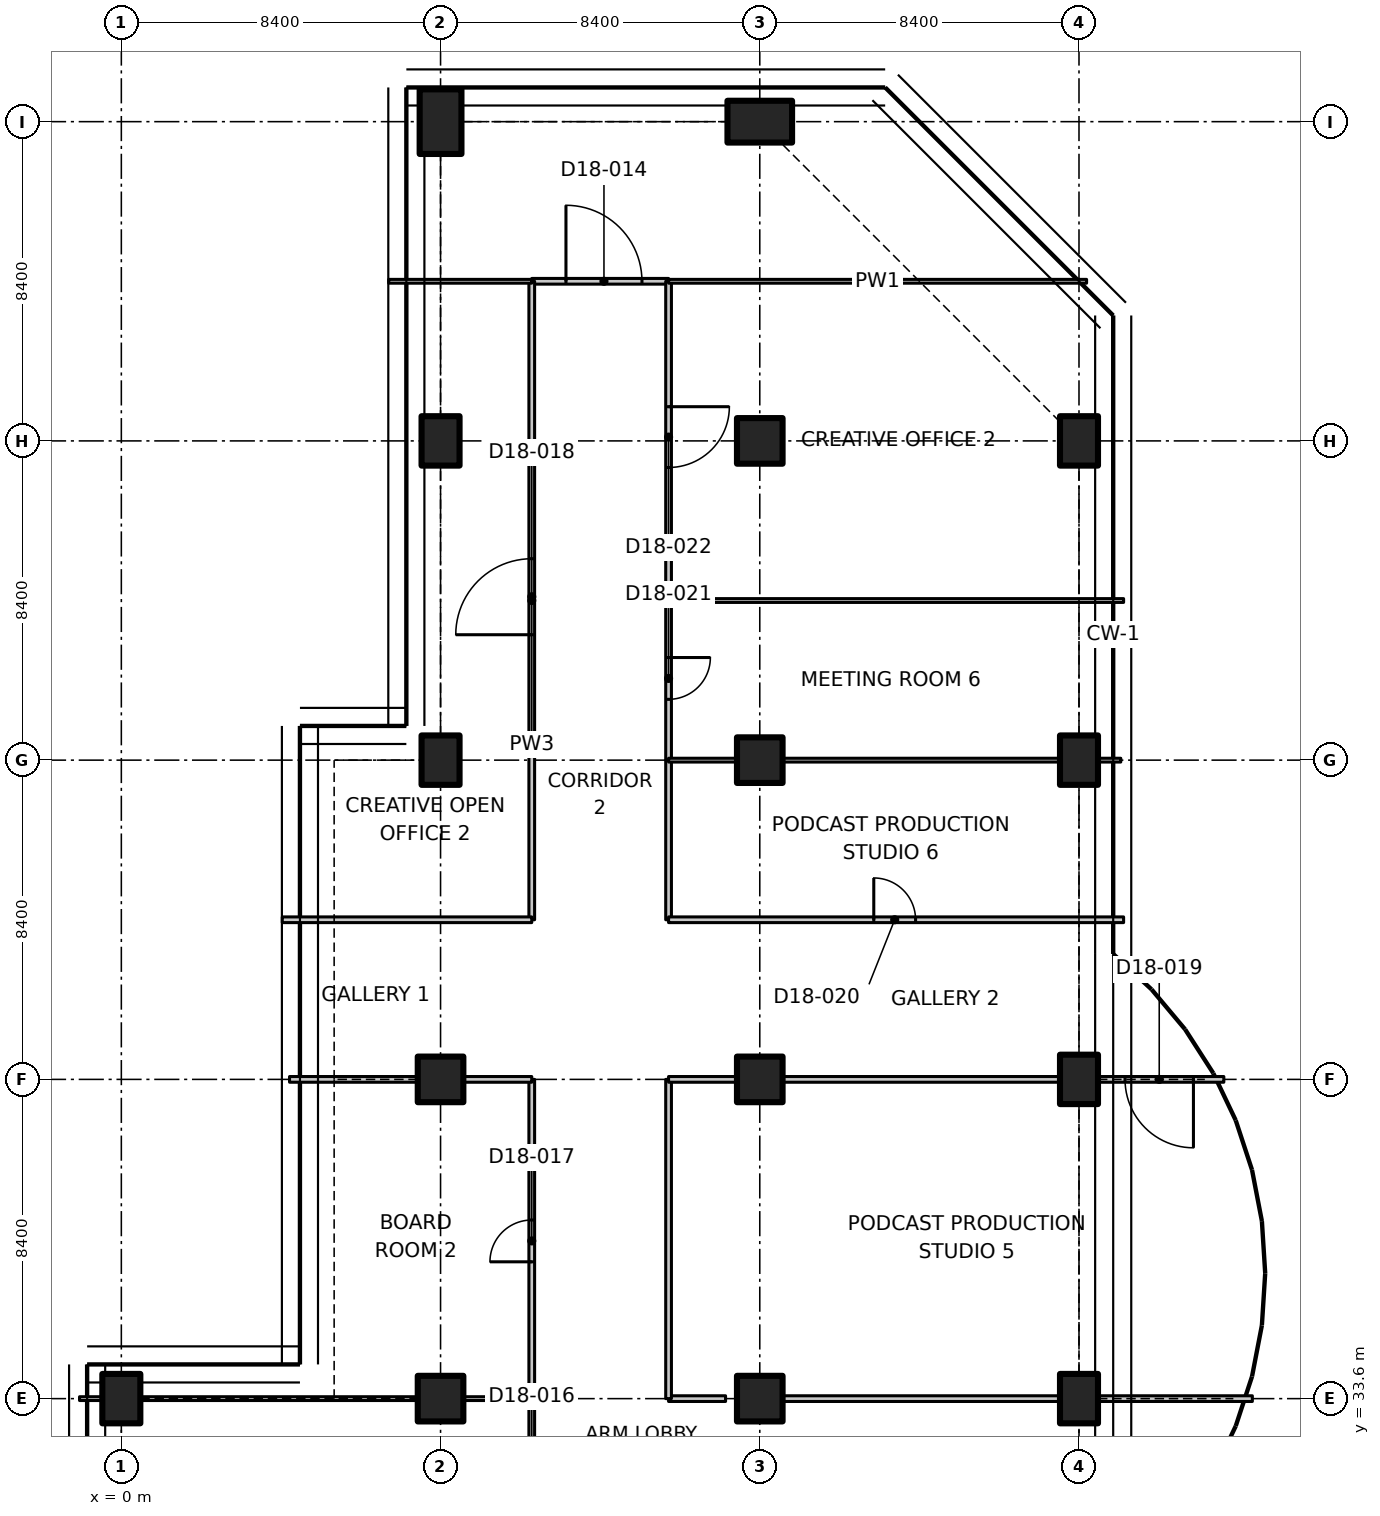
"""IFC4 building model, lengths in metres.
Left out: names, types, materials, properties, quantities, classifications, styles, units other than length and angle.
Written with IfcOpenShell. Run it as: python <this file> out.ifc"""

import sys

from ifc_helpers import new_model, si_unit, direction, frame, frame_2d, origin, origin_2d, place, context, subcontext, project, spatial, polyline, rectangle, outline, extrude, element, fill, save


model = new_model("IFC4")
c1 = context("Model", 3, precision=1e-05, world=origin(), true_north=direction((0.0, 1.0)))
c2 = subcontext(c1, "Body", "Model", "MODEL_VIEW")
j1 = project(units=[si_unit("LENGTHUNIT", "METRE"), si_unit("PLANEANGLEUNIT", "RADIAN")], contexts=[c1])
p1 = place(None, origin())
s1 = spatial("IfcSite", under=j1, at=p1, CompositionType="ELEMENT")
p2 = place(p1, origin())
s2 = spatial("IfcBuilding", under=s1, at=p2, CompositionType="ELEMENT")
p3 = place(p2, frame((0.0, 0.0, 152.9)))
s3 = spatial("IfcBuildingStorey", under=s2, at=p3, CompositionType="ELEMENT", Elevation=152.9)
p4 = place(p3, frame((0.0, 33.6, 0.0), z_axis=(0.0, 0.0, 1.0), x_axis=(1.0, 0.0, 0.0)))
e1 = element("IfcColumn", 1, at=p4, inside=s3, PredefinedType="COLUMN", context=c2, shape_type="SweptSolid", body=[
    extrude(rectangle(XDim=1.0, YDim=1.3, at=origin_2d()), origin(), (0.0, 0.0, 1.0), 3.3),
])
for number, where, z_axis, x_axis in (
    (2, (8.4, 33.6, 0.0), (0.0, 0.0, 1.0), (1.0, 0.0, 0.0)),
    (3, (8.4, 42.0, 0.0), (0.0, 0.0, 1.0), (1.0, 0.0, 0.0)),
):
    element("IfcColumn", number, at=place(p3, frame(where, z_axis=z_axis, x_axis=x_axis)), inside=s3, PredefinedType="COLUMN", context=c2, shape_type="SweptSolid", body=[
        extrude(rectangle(XDim=1.2, YDim=1.2, at=origin_2d()), origin(), (0.0, 0.0, 1.0), 3.3),
    ])
for number, where, z_axis, x_axis in (
    (4, (8.4, 50.4, 0.0), (0.0, 0.0, 1.0), (1.0, 0.0, 0.0)),
    (5, (8.4, 58.8, 0.0), (0.0, 0.0, 1.0), (1.0, 0.0, 0.0)),
):
    element("IfcColumn", number, at=place(p3, frame(where, z_axis=z_axis, x_axis=x_axis)), inside=s3, PredefinedType="COLUMN", context=c2, shape_type="SweptSolid", body=[
        extrude(rectangle(XDim=1.0, YDim=1.3, at=origin_2d()), origin(), (0.0, 0.0, 1.0), 3.3),
    ])
p5 = place(p3, frame((8.4, 67.2, 0.0), z_axis=(0.0, 0.0, 1.0), x_axis=(1.0, 0.0, 0.0)))
e6 = element("IfcColumn", 6, at=p5, inside=s3, PredefinedType="COLUMN", context=c2, shape_type="SweptSolid", body=[
    extrude(rectangle(XDim=1.1, YDim=1.7, at=origin_2d()), origin(), (0.0, 0.0, 1.0), 3.3),
])
for number, where, z_axis, x_axis in (
    (7, (16.8, 33.6, 0.0), (0.0, 0.0, 1.0), (1.0, 0.0, 0.0)),
    (8, (16.8, 42.0, 0.0), (0.0, 0.0, 1.0), (1.0, 0.0, 0.0)),
    (9, (16.8, 50.4, 0.0), (0.0, 0.0, 1.0), (1.0, 0.0, 0.0)),
    (10, (16.8, 58.8, 0.0), (0.0, 0.0, 1.0), (1.0, 0.0, 0.0)),
):
    element("IfcColumn", number, at=place(p3, frame(where, z_axis=z_axis, x_axis=x_axis)), inside=s3, PredefinedType="COLUMN", context=c2, shape_type="SweptSolid", body=[
        extrude(rectangle(XDim=1.2, YDim=1.2, at=origin_2d()), origin(), (0.0, 0.0, 1.0), 3.3),
    ])
p6 = place(p3, frame((16.8, 67.2, 0.0), z_axis=(0.0, 0.0, 1.0), x_axis=(0.0, 1.0, 0.0)))
e11 = element("IfcColumn", 11, at=p6, inside=s3, PredefinedType="COLUMN", context=c2, shape_type="SweptSolid", body=[
    extrude(rectangle(XDim=1.1, YDim=1.7, at=origin_2d()), origin(), (0.0, 0.0, 1.0), 3.3),
])
for number, where, z_axis, x_axis in (
    (12, (25.2, 33.6, 0.0), (0.0, 0.0, 1.0), (1.0, 0.0, 0.0)),
    (13, (25.2, 42.0, 0.0), (0.0, 0.0, 1.0), (1.0, 0.0, 0.0)),
    (14, (25.2, 50.4, 0.0), (0.0, 0.0, 1.0), (1.0, 0.0, 0.0)),
    (15, (25.2, 58.8, 0.0), (0.0, 0.0, 1.0), (1.0, 0.0, 0.0)),
):
    element("IfcColumn", number, at=place(p3, frame(where, z_axis=z_axis, x_axis=x_axis)), inside=s3, PredefinedType="COLUMN", context=c2, shape_type="SweptSolid", body=[
        extrude(rectangle(XDim=1.0, YDim=1.3, at=origin_2d()), origin(), (0.0, 0.0, 1.0), 3.3),
    ])
p7 = place(p3, frame((10.8, 29.4, 0.0), z_axis=(0.0, 0.0, 1.0), x_axis=(0.0, 1.0, 0.0)))
e16 = element("IfcWall", 16, at=p7, inside=s3, PredefinedType="PARTITIONING", context=c2, shape_type="SweptSolid", body=[
    extrude(rectangle(XDim=4.2, YDim=0.15, at=frame_2d((2.1, 0.0))), origin(), (0.0, 0.0, 1.0), 3.28),
])
p8 = place(p7, frame((1.5, 0.0, 0.0)))
e17 = element("IfcOpeningElement", 17, at=p8, cuts=e16, PredefinedType="OPENING", context=c2, shape_type="SweptSolid", body=[
    extrude(rectangle(XDim=1.1, YDim=2.1, at=frame_2d((0.55, 1.05))), frame((0.0, 0.085, 0.0), z_axis=(0.0, -1.0, 0.0), x_axis=(1.0, 0.0, 0.0)), (0.0, 0.0, 1.0), 0.17),
])
p9 = place(p3, frame((14.4, 33.6, 0.0), z_axis=(0.0, 0.0, 1.0), x_axis=(1.0, 0.0, 0.0)))
e18 = element("IfcWall", 18, at=p9, inside=s3, PredefinedType="PARTITIONING", context=c2, shape_type="SweptSolid", body=[
    extrude(rectangle(XDim=1.5, YDim=0.15, at=frame_2d((0.75, 0.0))), origin(), (0.0, 0.0, 1.0), 3.28),
])
p10 = place(p3, frame((17.42, 33.6, 0.0), z_axis=(0.0, 0.0, 1.0), x_axis=(1.0, 0.0, 0.0)))
e19 = element("IfcWall", 19, at=p10, inside=s3, PredefinedType="PARTITIONING", context=c2, shape_type="SweptSolid", body=[
    extrude(rectangle(XDim=7.26, YDim=0.15, at=frame_2d((3.63, 0.0))), origin(), (0.0, 0.0, 1.0), 3.28),
])
p11 = place(p3, frame((25.72, 33.6, 0.0), z_axis=(0.0, 0.0, 1.0), x_axis=(1.0, 0.0, 0.0)))
e20 = element("IfcWall", 20, at=p11, inside=s3, PredefinedType="PARTITIONING", context=c2, shape_type="SweptSolid", body=[
    extrude(rectangle(XDim=4.042, YDim=0.15, at=frame_2d((2.021, 0.0))), origin(), (0.0, 0.0, 1.0), 2.93),
])
p12 = place(p3, frame((10.8, 63.0, 0.0), z_axis=(0.0, 0.0, 1.0), x_axis=(1.0, 0.0, 0.0)))
e21 = element("IfcWall", 21, at=p12, inside=s3, PredefinedType="PARTITIONING", context=c2, shape_type="SweptSolid", body=[
    extrude(rectangle(XDim=3.6, YDim=0.15, at=frame_2d((1.8, 0.0))), origin(), (0.0, 0.0, 1.0), 3.28),
])
p13 = place(p12, frame((0.9, 0.0, 0.0)))
e22 = element("IfcOpeningElement", 22, at=p13, cuts=e21, PredefinedType="OPENING", context=c2, shape_type="SweptSolid", body=[
    extrude(rectangle(XDim=2.0, YDim=2.4, at=frame_2d((1.0, 1.2))), frame((0.0, 0.085, 0.0), z_axis=(0.0, -1.0, 0.0), x_axis=(1.0, 0.0, 0.0)), (0.0, 0.0, 1.0), 0.17),
])
p14 = place(p3, frame((10.8, 33.6, 0.0), z_axis=(0.0, 0.0, 1.0), x_axis=(0.0, 1.0, 0.0)))
e23 = element("IfcWall", 23, at=p14, inside=s3, PredefinedType="PARTITIONING", context=c2, shape_type="SweptSolid", body=[
    extrude(rectangle(XDim=8.4, YDim=0.15, at=frame_2d((4.2, 0.0))), origin(), (0.0, 0.0, 1.0), 3.28),
])
p15 = place(p14, frame((3.6, 0.0, 0.0)))
e24 = element("IfcOpeningElement", 24, at=p15, cuts=e23, PredefinedType="OPENING", context=c2, shape_type="SweptSolid", body=[
    extrude(rectangle(XDim=1.1, YDim=2.1, at=frame_2d((0.55, 1.05))), frame((0.0, 0.085, 0.0), z_axis=(0.0, -1.0, 0.0), x_axis=(1.0, 0.0, 0.0)), (0.0, 0.0, 1.0), 0.17),
])
p16 = place(p3, frame((10.8, 46.2, 0.0), z_axis=(0.0, 0.0, 1.0), x_axis=(0.0, 1.0, 0.0)))
e25 = element("IfcWall", 25, at=p16, inside=s3, PredefinedType="PARTITIONING", context=c2, shape_type="SweptSolid", body=[
    extrude(rectangle(XDim=16.8, YDim=0.15, at=frame_2d((8.4, 0.0))), origin(), (0.0, 0.0, 1.0), 3.28),
])
p17 = place(p16, frame((7.5, 0.0, 0.0)))
e26 = element("IfcOpeningElement", 26, at=p17, cuts=e25, PredefinedType="OPENING", context=c2, shape_type="SweptSolid", body=[
    extrude(rectangle(XDim=2.0, YDim=2.4, at=frame_2d((1.0, 1.2))), frame((0.0, 0.085, 0.0), z_axis=(0.0, -1.0, 0.0), x_axis=(1.0, 0.0, 0.0)), (0.0, 0.0, 1.0), 0.17),
])
p18 = place(p3, frame((14.4, 42.0, 0.0), z_axis=(0.0, 0.0, 1.0), x_axis=(0.0, -1.0, 0.0)))
e27 = element("IfcWall", 27, at=p18, inside=s3, PredefinedType="PARTITIONING", context=c2, shape_type="SweptSolid", body=[
    extrude(rectangle(XDim=8.4, YDim=0.15, at=frame_2d((4.2, 0.0))), origin(), (0.0, 0.0, 1.0), 3.28),
])
p19 = place(p3, frame((14.4, 50.4, 0.0), z_axis=(0.0, 0.0, 1.0), x_axis=(0.0, -1.0, 0.0)))
e28 = element("IfcWall", 28, at=p19, inside=s3, PredefinedType="PARTITIONING", context=c2, shape_type="SweptSolid", body=[
    extrude(rectangle(XDim=4.2, YDim=0.15, at=frame_2d((2.1, 0.0))), origin(), (0.0, 0.0, 1.0), 3.28),
])
p20 = place(p3, frame((14.4, 54.6, 0.0), z_axis=(0.0, 0.0, 1.0), x_axis=(0.0, -1.0, 0.0)))
e29 = element("IfcWall", 29, at=p20, inside=s3, PredefinedType="PARTITIONING", context=c2, shape_type="SweptSolid", body=[
    extrude(rectangle(XDim=4.2, YDim=0.15, at=frame_2d((2.1, 0.0))), origin(), (0.0, 0.0, 1.0), 3.28),
])
p21 = place(p20, frame((1.5, 0.0, 0.0)))
e30 = element("IfcOpeningElement", 30, at=p21, cuts=e29, PredefinedType="OPENING", context=c2, shape_type="SweptSolid", body=[
    extrude(rectangle(XDim=1.1, YDim=2.1, at=frame_2d((0.55, 1.05))), frame((0.0, 0.085, 0.0), z_axis=(0.0, -1.0, 0.0), x_axis=(1.0, 0.0, 0.0)), (0.0, 0.0, 1.0), 0.17),
])
p22 = place(p3, frame((14.4, 63.0, 0.0), z_axis=(0.0, 0.0, 1.0), x_axis=(0.0, -1.0, 0.0)))
e31 = element("IfcWall", 31, at=p22, inside=s3, PredefinedType="PARTITIONING", context=c2, shape_type="SweptSolid", body=[
    extrude(rectangle(XDim=8.4, YDim=0.15, at=frame_2d((4.2, 0.0))), origin(), (0.0, 0.0, 1.0), 3.28),
])
p23 = place(p22, frame((3.3, 0.0, 0.0)))
e32 = element("IfcOpeningElement", 32, at=p23, cuts=e31, PredefinedType="OPENING", context=c2, shape_type="SweptSolid", body=[
    extrude(rectangle(XDim=1.6, YDim=2.1, at=frame_2d((0.8, 1.05))), frame((0.0, 0.085, 0.0), z_axis=(0.0, -1.0, 0.0), x_axis=(1.0, 0.0, 0.0)), (0.0, 0.0, 1.0), 0.17),
])
p24 = place(p3, frame((10.8, 63.0, 0.0), z_axis=(0.0, 0.0, 1.0), x_axis=(-1.0, 0.0, 0.0)))
e33 = element("IfcWall", 33, at=p24, inside=s3, PredefinedType="PARTITIONING", context=c2, shape_type="SweptSolid", body=[
    extrude(rectangle(XDim=3.765, YDim=0.1, at=frame_2d((1.883, 0.0))), origin(), (0.0, 0.0, 1.0), 2.93),
])
p25 = place(p3, frame((25.4, 63.0, 0.0), z_axis=(0.0, 0.0, 1.0), x_axis=(-1.0, 0.0, 0.0)))
e34 = element("IfcWall", 34, at=p25, inside=s3, PredefinedType="PARTITIONING", context=c2, shape_type="SweptSolid", body=[
    extrude(outline(polyline([(0.0, 0.0), (11.0, 0.0), (11.0, 3.28), (5.066, 3.28), (5.064, 2.93), (3.736, 2.93), (3.734, 3.28), (0.0, 3.28), (0.0, 0.0)])), frame((0.0, 0.05, 0.0), z_axis=(0.0, -1.0, 0.0), x_axis=(1.0, 0.0, 0.0)), (0.0, 0.0, 1.0), 0.1),
])
p26 = place(p3, frame((10.8, 42.0, 0.0), z_axis=(0.0, 0.0, 1.0), x_axis=(-1.0, 0.0, 0.0)))
e35 = element("IfcWall", 35, at=p26, inside=s3, PredefinedType="PARTITIONING", context=c2, shape_type="SweptSolid", body=[
    extrude(rectangle(XDim=1.78, YDim=0.15, at=frame_2d((0.89, 0.0))), origin(), (0.0, 0.0, 1.0), 3.28),
])
p27 = place(p3, frame((7.78, 42.0, 0.0), z_axis=(0.0, 0.0, 1.0), x_axis=(-1.0, 0.0, 0.0)))
e36 = element("IfcWall", 36, at=p27, inside=s3, PredefinedType="PARTITIONING", context=c2, shape_type="SweptSolid", body=[
    extrude(rectangle(XDim=3.354, YDim=0.15, at=frame_2d((1.677, 0.0))), origin(), (0.0, 0.0, 1.0), 2.93),
])
p28 = place(p3, frame((4.235, 46.2, 0.0), z_axis=(0.0, 0.0, 1.0), x_axis=(1.0, 0.0, 0.0)))
e37 = element("IfcWall", 37, at=p28, inside=s3, PredefinedType="PARTITIONING", context=c2, shape_type="SweptSolid", body=[
    extrude(outline(polyline([(0.0, 0.0), (6.565, 0.0), (6.565, 3.28), (1.815, 3.28), (1.813, 2.93), (0.917, 2.93), (0.915, 3.28), (0.265, 3.28), (0.0, 3.28), (0.0, 0.0)])), frame((0.0, 0.075, 0.0), z_axis=(0.0, -1.0, 0.0), x_axis=(1.0, 0.0, 0.0)), (0.0, 0.0, 1.0), 0.15),
])
p29 = place(p3, frame((-1.1, 33.6, 0.0), z_axis=(0.0, 0.0, 1.0), x_axis=(1.0, 0.0, 0.0)))
e38 = element("IfcWall", 38, at=p29, inside=s3, PredefinedType="PARTITIONING", context=c2, shape_type="SweptSolid", body=[
    extrude(rectangle(XDim=0.58, YDim=0.1, at=frame_2d((0.29, 0.0))), origin(), (0.0, 0.0, 1.0), 3.28),
])
p30 = place(p3, frame((0.52, 33.6, 0.0), z_axis=(0.0, 0.0, 1.0), x_axis=(1.0, 0.0, 0.0)))
e39 = element("IfcWall", 39, at=p30, inside=s3, PredefinedType="PARTITIONING", context=c2, shape_type="SweptSolid", body=[
    extrude(outline(polyline([(0.0, 0.0), (7.26, 0.0), (7.26, 2.93), (0.0, 2.93), (0.0, 0.0)])), frame((0.0, 0.05, 0.0), z_axis=(0.0, -1.0, 0.0), x_axis=(1.0, 0.0, 0.0)), (0.0, 0.0, 1.0), 0.1),
])
p31 = place(p3, frame((9.02, 33.6, 0.0), z_axis=(0.0, 0.0, 1.0), x_axis=(1.0, 0.0, 0.0)))
e40 = element("IfcWall", 40, at=p31, inside=s3, PredefinedType="PARTITIONING", context=c2, shape_type="SweptSolid", body=[
    extrude(rectangle(XDim=1.78, YDim=0.1, at=frame_2d((0.89, 0.0))), origin(), (0.0, 0.0, 1.0), 3.28),
])
p32 = place(p3, frame((29.011, 42.0, 0.0), z_axis=(0.0, 0.0, 1.0), x_axis=(-1.0, 0.0, 0.0)))
e41 = element("IfcWall", 41, at=p32, inside=s3, PredefinedType="PARTITIONING", context=c2, shape_type="SweptSolid", body=[
    extrude(rectangle(XDim=3.292, YDim=0.15, at=frame_2d((1.646, 0.0))), origin(), (0.0, 0.0, 1.0), 2.93),
])
p33 = place(p32, frame((0.8, 0.0, 0.0)))
e42 = element("IfcOpeningElement", 42, at=p33, cuts=e41, PredefinedType="OPENING", context=c2, shape_type="SweptSolid", body=[
    extrude(rectangle(XDim=1.8, YDim=2.1, at=frame_2d((0.9, 1.05))), frame((0.0, 0.085, 0.0), z_axis=(0.0, -1.0, 0.0), x_axis=(1.0, 0.0, 0.0)), (0.0, 0.0, 1.0), 0.17),
])
p34 = place(p3, frame((24.68, 42.0, 0.0), z_axis=(0.0, 0.0, 1.0), x_axis=(-1.0, 0.0, 0.0)))
e43 = element("IfcWall", 43, at=p34, inside=s3, PredefinedType="PARTITIONING", context=c2, shape_type="SweptSolid", body=[
    extrude(rectangle(XDim=7.26, YDim=0.15, at=frame_2d((3.63, 0.0))), origin(), (0.0, 0.0, 1.0), 3.28),
])
p35 = place(p3, frame((16.18, 42.0, 0.0), z_axis=(0.0, 0.0, 1.0), x_axis=(-1.0, 0.0, 0.0)))
e44 = element("IfcWall", 44, at=p35, inside=s3, PredefinedType="PARTITIONING", context=c2, shape_type="SweptSolid", body=[
    extrude(rectangle(XDim=1.78, YDim=0.15, at=frame_2d((0.89, 0.0))), origin(), (0.0, 0.0, 1.0), 3.28),
])
p36 = place(p3, frame((14.4, 46.2, 0.0), z_axis=(0.0, 0.0, 1.0), x_axis=(1.0, 0.0, 0.0)))
e45 = element("IfcWall", 45, at=p36, inside=s3, PredefinedType="PARTITIONING", context=c2, shape_type="SweptSolid", body=[
    extrude(outline(polyline([(0.0, 0.0), (11.974, 0.0), (11.974, 3.28), (11.9, 3.28), (11.25, 3.28), (11.248, 2.93), (10.352, 2.93), (10.35, 3.28), (0.0, 3.28), (0.0, 0.0)])), frame((0.0, 0.075, 0.0), z_axis=(0.0, -1.0, 0.0), x_axis=(1.0, 0.0, 0.0)), (0.0, 0.0, 1.0), 0.15),
])
p37 = place(p36, frame((5.4, 0.0, 0.0)))
e46 = element("IfcOpeningElement", 46, at=p37, cuts=e45, PredefinedType="OPENING", context=c2, shape_type="SweptSolid", body=[
    extrude(rectangle(XDim=1.1, YDim=2.1, at=frame_2d((0.55, 1.05))), frame((0.0, 0.085, 0.0), z_axis=(0.0, -1.0, 0.0), x_axis=(1.0, 0.0, 0.0)), (0.0, 0.0, 1.0), 0.17),
])
p38 = place(p3, frame((14.4, 50.4, 0.0), z_axis=(0.0, 0.0, 1.0), x_axis=(1.0, 0.0, 0.0)))
e47 = element("IfcWall", 47, at=p38, inside=s3, PredefinedType="PARTITIONING", context=c2, shape_type="SweptSolid", body=[
    extrude(rectangle(XDim=1.78, YDim=0.1, at=frame_2d((0.89, 0.0))), origin(), (0.0, 0.0, 1.0), 3.28),
])
p39 = place(p3, frame((17.42, 50.4, 0.0), z_axis=(0.0, 0.0, 1.0), x_axis=(1.0, 0.0, 0.0)))
e48 = element("IfcWall", 48, at=p39, inside=s3, PredefinedType="PARTITIONING", context=c2, shape_type="SweptSolid", body=[
    extrude(rectangle(XDim=7.26, YDim=0.1, at=frame_2d((3.63, 0.0))), origin(), (0.0, 0.0, 1.0), 3.28),
])
p40 = place(p3, frame((25.72, 50.4, 0.0), z_axis=(0.0, 0.0, 1.0), x_axis=(1.0, 0.0, 0.0)))
e49 = element("IfcWall", 49, at=p40, inside=s3, PredefinedType="PARTITIONING", context=c2, shape_type="SweptSolid", body=[
    extrude(rectangle(XDim=0.58, YDim=0.1, at=frame_2d((0.29, 0.0))), origin(), (0.0, 0.0, 1.0), 3.28),
])
p41 = place(p3, frame((14.4, 54.6, 0.0), z_axis=(0.0, 0.0, 1.0), x_axis=(1.0, 0.0, 0.0)))
e50 = element("IfcWall", 50, at=p41, inside=s3, PredefinedType="PARTITIONING", context=c2, shape_type="SweptSolid", body=[
    extrude(outline(polyline([(0.0, 0.0), (11.974, 0.0), (11.974, 3.28), (11.9, 3.28), (11.25, 3.28), (11.248, 2.93), (10.352, 2.93), (10.35, 3.28), (0.0, 3.28), (0.0, 0.0)])), frame((0.0, 0.05, 0.0), z_axis=(0.0, -1.0, 0.0), x_axis=(1.0, 0.0, 0.0)), (0.0, 0.0, 1.0), 0.1),
])
p42 = place(p13, origin())
e51 = element("IfcDoor", 51, at=p42, inside=s3, OperationType="DOUBLE_DOOR_SINGLE_SWING", PredefinedType="DOOR", context=c2, shape_type="SweptSolid", body=[
    extrude(rectangle(XDim=2.0, YDim=2.4, at=frame_2d((1.0, 1.2))), frame((0.0, 0.025, 0.0), z_axis=(0.0, -1.0, 0.0), x_axis=(1.0, 0.0, 0.0)), (0.0, 0.0, 1.0), 0.05),
])
fill(e22, e51)
p43 = place(p15, origin())
e52 = element("IfcDoor", 52, at=p43, inside=s3, OperationType="SINGLE_SWING_LEFT", PredefinedType="DOOR", context=c2, shape_type="SweptSolid", body=[
    extrude(rectangle(XDim=1.1, YDim=2.1, at=frame_2d((0.55, 1.05))), frame((0.0, 0.025, 0.0), z_axis=(0.0, -1.0, 0.0), x_axis=(1.0, 0.0, 0.0)), (0.0, 0.0, 1.0), 0.05),
])
fill(e24, e52)
p44 = place(p17, origin())
e53 = element("IfcDoor", 53, at=p44, inside=s3, OperationType="DOUBLE_DOOR_SINGLE_SWING", PredefinedType="DOOR", context=c2, shape_type="SweptSolid", body=[
    extrude(rectangle(XDim=2.0, YDim=2.4, at=frame_2d((1.0, 1.2))), frame((0.0, 0.025, 0.0), z_axis=(0.0, -1.0, 0.0), x_axis=(1.0, 0.0, 0.0)), (0.0, 0.0, 1.0), 0.05),
])
fill(e26, e53)
p45 = place(p33, origin())
e54 = element("IfcDoor", 54, at=p45, inside=s3, OperationType="DOUBLE_DOOR_SINGLE_SWING", PredefinedType="DOOR", context=c2, shape_type="SweptSolid", body=[
    extrude(rectangle(XDim=1.8, YDim=2.1, at=frame_2d((0.9, 1.05))), frame((0.0, 0.025, 0.0), z_axis=(0.0, -1.0, 0.0), x_axis=(1.0, 0.0, 0.0)), (0.0, 0.0, 1.0), 0.05),
])
fill(e42, e54)
p46 = place(p37, origin())
e55 = element("IfcDoor", 55, at=p46, inside=s3, OperationType="SINGLE_SWING_LEFT", PredefinedType="DOOR", context=c2, shape_type="SweptSolid", body=[
    extrude(rectangle(XDim=1.1, YDim=2.1, at=frame_2d((0.55, 1.05))), frame((0.0, 0.025, 0.0), z_axis=(0.0, -1.0, 0.0), x_axis=(1.0, 0.0, 0.0)), (0.0, 0.0, 1.0), 0.05),
])
fill(e46, e55)
p47 = place(p21, origin())
e56 = element("IfcDoor", 56, at=p47, inside=s3, OperationType="SINGLE_SWING_LEFT", PredefinedType="DOOR", context=c2, shape_type="SweptSolid", body=[
    extrude(rectangle(XDim=1.1, YDim=2.1, at=frame_2d((0.55, 1.05))), frame((0.0, 0.025, 0.0), z_axis=(0.0, -1.0, 0.0), x_axis=(1.0, 0.0, 0.0)), (0.0, 0.0, 1.0), 0.05),
])
fill(e30, e56)
p48 = place(p23, origin())
e57 = element("IfcDoor", 57, at=p48, inside=s3, OperationType="DOUBLE_DOOR_SINGLE_SWING", PredefinedType="DOOR", context=c2, shape_type="SweptSolid", body=[
    extrude(rectangle(XDim=1.6, YDim=2.1, at=frame_2d((0.8, 1.05))), frame((0.0, 0.025, 0.0), z_axis=(0.0, -1.0, 0.0), x_axis=(1.0, 0.0, 0.0)), (0.0, 0.0, 1.0), 0.05),
])
fill(e32, e57)
save(model, sys.argv[1])
